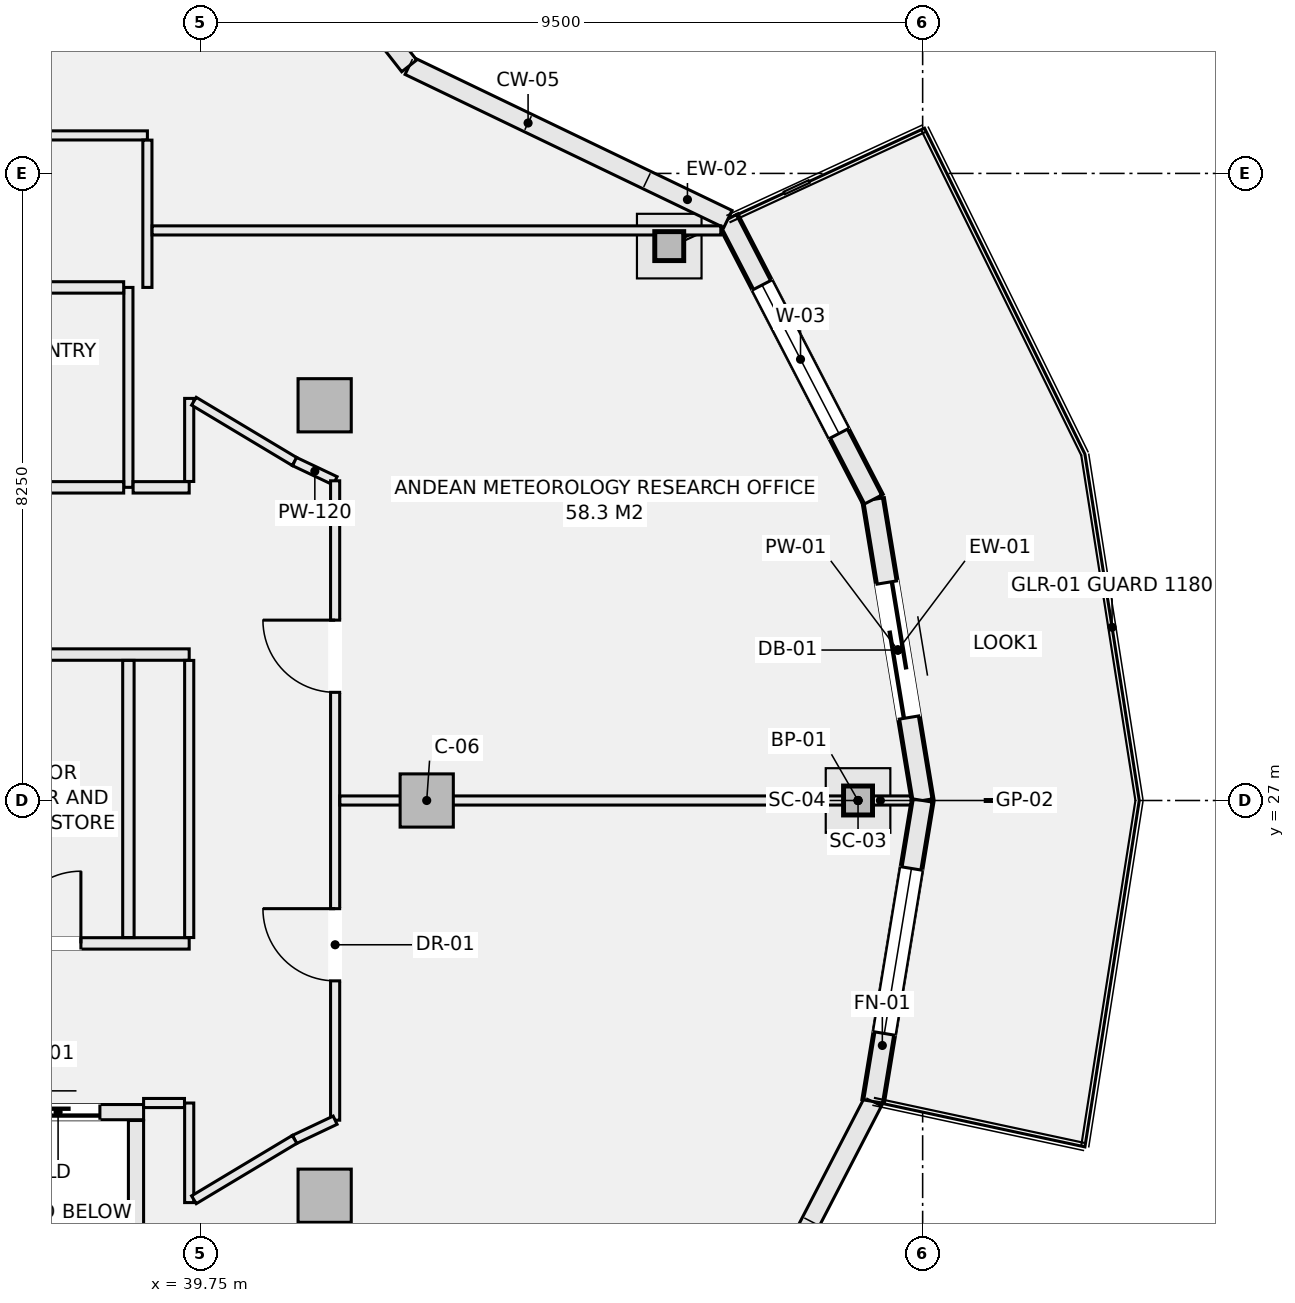
"""IFC4 building model, lengths in metres.
Left out: names, types, materials, properties, quantities, classifications, styles, units other than length and angle.
Written with IfcOpenShell. Run it as: python <this file> out.ifc"""

import sys

from ifc_helpers import new_model, si_unit, direction, frame, frame_2d, origin, origin_2d, place, context, subcontext, project, spatial, rectangle, hollow_rectangle, extrude, element, fill, save


model = new_model("IFC4")
c1 = context("Model", 3, precision=1e-05, world=origin(), true_north=direction((0.0, 1.0)))
c2 = subcontext(c1, "Body", "Model", "MODEL_VIEW")
j1 = project(units=[si_unit("LENGTHUNIT", "METRE"), si_unit("PLANEANGLEUNIT", "RADIAN")], contexts=[c1])
p1 = place(None, origin())
s1 = spatial("IfcSite", under=j1, at=p1, CompositionType="ELEMENT")
p2 = place(p1, origin())
s2 = spatial("IfcBuilding", under=s1, at=p2, CompositionType="ELEMENT")
p3 = place(p2, frame((0.0, 0.0, 281.6)))
s3 = spatial("IfcBuildingStorey", under=s2, at=p3, CompositionType="ELEMENT", Elevation=281.6)
for number, where, z_axis, x_axis in (
    (1, (48.4, 27.0, -0.28), (0.0, 0.0, 1.0), (1.0, 0.0, 0.0)),
    (2, (45.916, 34.294, -0.28), (0.0, 0.0, 1.0), (1.0, 0.0, 0.0)),
):
    element("IfcColumn", number, at=place(p3, frame(where, z_axis=z_axis, x_axis=x_axis)), inside=s3, PredefinedType="COLUMN", context=c2, shape_type="SweptSolid", body=[
        extrude(hollow_rectangle(XDim=0.406, YDim=0.406, WallThickness=0.016, at=origin_2d()), origin(), (0.0, 0.0, 1.0), 5.78),
    ])
for number, where, z_axis, x_axis in (
    (3, (42.725, 27.0, -0.28), (0.0, 0.0, 1.0), (1.0, 0.0, 0.0)),
    (4, (41.382, 32.199, -0.28), (0.0, 0.0, 1.0), (1.0, 0.0, 0.0)),
    (5, (41.382, 21.801, -0.28), (0.0, 0.0, 1.0), (1.0, 0.0, 0.0)),
):
    element("IfcColumn", number, at=place(p3, frame(where, z_axis=z_axis, x_axis=x_axis)), inside=s3, PredefinedType="COLUMN", context=c2, shape_type="SweptSolid", body=[
        extrude(rectangle(XDim=0.7, YDim=0.7, at=origin_2d()), origin(), (0.0, 0.0, 1.0), 5.78),
    ])
for number, where, z_axis, x_axis in (
    (6, (48.4, 27.0, 5.5), (0.0, 0.0, 1.0), (1.0, 0.0, 0.0)),
    (7, (45.916, 34.294, 5.5), (0.0, 0.0, 1.0), (1.0, 0.0, 0.0)),
):
    element("IfcColumn", number, at=place(p3, frame(where, z_axis=z_axis, x_axis=x_axis)), inside=s3, PredefinedType="COLUMN", context=c2, shape_type="SweptSolid", body=[
        extrude(hollow_rectangle(XDim=0.356, YDim=0.356, WallThickness=0.016, at=origin_2d()), origin(), (0.0, 0.0, 1.0), 4.2),
    ])
p4 = place(p3, frame((48.598, 30.96, 0.0), z_axis=(0.0, 0.0, 1.0), x_axis=(0.162366447696, -0.9867305289, 0.0)))
e8 = element("IfcWall", 8, at=p4, inside=s3, PredefinedType="SOLIDWALL", context=c2, shape_type="SweptSolid", body=[
    extrude(rectangle(XDim=4.013, YDim=0.3, at=frame_2d((2.007, 0.0))), origin(), (0.0, 0.0, 1.0), 4.292),
])
p5 = place(p4, frame((1.107, 0.0, 0.0)))
e9 = element("IfcOpeningElement", 9, at=p5, cuts=e8, PredefinedType="OPENING", context=c2, shape_type="SweptSolid", body=[
    extrude(rectangle(XDim=1.8, YDim=2.25, at=frame_2d((0.9, 1.125))), frame((0.0, 0.16, 0.0), z_axis=(0.0, -1.0, 0.0), x_axis=(1.0, 0.0, 0.0)), (0.0, 0.0, 1.0), 0.32),
])
p6 = place(p3, frame((46.688, 34.65, 0.0), z_axis=(0.0, 0.0, 1.0), x_axis=(0.459812881143, -0.888015830002, 0.0)))
e10 = element("IfcWall", 10, at=p6, inside=s3, PredefinedType="SOLIDWALL", context=c2, shape_type="SweptSolid", body=[
    extrude(rectangle(XDim=4.155, YDim=0.3, at=frame_2d((2.078, 0.0))), origin(), (0.0, 0.0, 1.0), 4.292),
])
p7 = place(p6, frame((0.978, 0.0, 0.72)))
e11 = element("IfcOpeningElement", 11, at=p7, cuts=e10, PredefinedType="OPENING", context=c2, shape_type="SweptSolid", body=[
    extrude(rectangle(XDim=2.2, YDim=1.65, at=frame_2d((1.1, 0.825))), frame((0.0, 0.16, 0.0), z_axis=(0.0, -1.0, 0.0), x_axis=(1.0, 0.0, 0.0)), (0.0, 0.0, 1.0), 0.32),
])
p8 = place(p3, frame((45.623, 35.162, 0.0), z_axis=(0.0, 0.0, 1.0), x_axis=(0.901303636532, -0.433187897769, 0.0)))
e12 = element("IfcWall", 12, at=p8, inside=s3, PredefinedType="SOLIDWALL", context=c2, shape_type="SweptSolid", body=[
    extrude(rectangle(XDim=1.181, YDim=0.22, at=frame_2d((0.591, 0.0))), origin(), (0.0, 0.0, 1.0), 4.292),
])
p9 = place(p3, frame((48.598, 23.04, 0.0), z_axis=(0.0, 0.0, 1.0), x_axis=(0.162366447696, 0.9867305289, 0.0)))
e13 = element("IfcWall", 13, at=p9, inside=s3, PredefinedType="SOLIDWALL", context=c2, shape_type="SweptSolid", body=[
    extrude(rectangle(XDim=4.013, YDim=0.3, at=frame_2d((2.007, 0.0))), origin(), (0.0, 0.0, 1.0), 4.292),
])
p10 = place(p9, frame((0.907, 0.0, 0.72)))
e14 = element("IfcOpeningElement", 14, at=p10, cuts=e13, PredefinedType="OPENING", context=c2, shape_type="SweptSolid", body=[
    extrude(rectangle(XDim=2.2, YDim=1.65, at=frame_2d((1.1, 0.825))), frame((0.0, 0.16, 0.0), z_axis=(0.0, -1.0, 0.0), x_axis=(1.0, 0.0, 0.0)), (0.0, 0.0, 1.0), 0.32),
])
p11 = place(p3, frame((48.598, 30.96, 5.75), z_axis=(0.0, 0.0, 1.0), x_axis=(0.162366447696, -0.9867305289, 0.0)))
e15 = element("IfcWall", 15, at=p11, inside=s3, PredefinedType="PARAPET", context=c2, shape_type="SweptSolid", body=[
    extrude(rectangle(XDim=4.013, YDim=0.25, at=frame_2d((2.007, 0.0))), origin(), (0.0, 0.0, 1.0), 1.15),
])
p12 = place(p3, frame((46.688, 34.65, 5.75), z_axis=(0.0, 0.0, 1.0), x_axis=(0.459812881143, -0.888015830002, 0.0)))
e16 = element("IfcWall", 16, at=p12, inside=s3, PredefinedType="PARAPET", context=c2, shape_type="SweptSolid", body=[
    extrude(rectangle(XDim=4.155, YDim=0.25, at=frame_2d((2.078, 0.0))), origin(), (0.0, 0.0, 1.0), 1.15),
])
p13 = place(p3, frame((42.494, 36.665, 5.75), z_axis=(0.0, 0.0, 1.0), x_axis=(0.901348560632, -0.433094414933, 0.0)))
e17 = element("IfcWall", 17, at=p13, inside=s3, PredefinedType="PARAPET", context=c2, shape_type="SweptSolid", body=[
    extrude(rectangle(XDim=4.652, YDim=0.25, at=frame_2d((2.326, 0.0))), origin(), (0.0, 0.0, 1.0), 1.15),
])
p14 = place(p3, frame((39.688, 40.25, 5.75), z_axis=(0.0, 0.0, 1.0), x_axis=(0.616428247224, -0.78741108452, 0.0)))
e18 = element("IfcWall", 18, at=p14, inside=s3, PredefinedType="PARAPET", context=c2, shape_type="SweptSolid", body=[
    extrude(rectangle(XDim=4.553, YDim=0.25, at=frame_2d((2.277, 0.0))), origin(), (0.0, 0.0, 1.0), 1.15),
])
p15 = place(p3, frame((46.688, 19.35, 5.75), z_axis=(0.0, 0.0, 1.0), x_axis=(0.459812881143, 0.888015830002, 0.0)))
e19 = element("IfcWall", 19, at=p15, inside=s3, PredefinedType="PARAPET", context=c2, shape_type="SweptSolid", body=[
    extrude(rectangle(XDim=4.155, YDim=0.25, at=frame_2d((2.078, 0.0))), origin(), (0.0, 0.0, 1.0), 1.15),
])
p16 = place(p3, frame((48.598, 23.04, 5.75), z_axis=(0.0, 0.0, 1.0), x_axis=(0.162366447696, 0.9867305289, 0.0)))
e20 = element("IfcWall", 20, at=p16, inside=s3, PredefinedType="PARAPET", context=c2, shape_type="SweptSolid", body=[
    extrude(rectangle(XDim=4.013, YDim=0.25, at=frame_2d((2.007, 0.0))), origin(), (0.0, 0.0, 1.0), 1.15),
])
p17 = place(p3, frame((36.75, 22.9, 0.0), z_axis=(0.0, 0.0, 1.0), x_axis=(1.0, 0.0, 0.0)))
e21 = element("IfcWall", 21, at=p17, inside=s3, PredefinedType="SOLIDWALL", context=c2, shape_type="SweptSolid", body=[
    extrude(rectangle(XDim=2.25, YDim=0.2, at=frame_2d((1.125, 0.0))), origin(), (0.0, 0.0, 1.0), 5.5),
])
p18 = place(p17, frame((0.575, 0.0, 0.0)))
e22 = element("IfcOpeningElement", 22, at=p18, cuts=e21, PredefinedType="OPENING", context=c2, shape_type="SweptSolid", body=[
    extrude(rectangle(XDim=1.1, YDim=2.2, at=frame_2d((0.55, 1.1))), frame((0.0, 0.11, 0.0), z_axis=(0.0, -1.0, 0.0), x_axis=(1.0, 0.0, 0.0)), (0.0, 0.0, 1.0), 0.22),
])
p19 = place(p3, frame((38.9, 20.36, 0.0), z_axis=(0.0, 0.0, 1.0), x_axis=(0.0, 1.0, 0.0)))
e23 = element("IfcWall", 23, at=p19, inside=s3, PredefinedType="SOLIDWALL", context=c2, shape_type="SweptSolid", body=[
    extrude(rectangle(XDim=2.43, YDim=0.2, at=frame_2d((1.215, 0.0))), origin(), (0.0, 0.0, 1.0), 5.5),
])
p20 = place(p3, frame((29.96, 25.12, 0.0), z_axis=(0.0, 0.0, 1.0), x_axis=(1.0, 0.0, 0.0)))
e24 = element("IfcWall", 24, at=p20, inside=s3, PredefinedType="PARTITIONING", context=c2, shape_type="SweptSolid", body=[
    extrude(rectangle(XDim=9.64, YDim=0.15, at=frame_2d((4.82, 0.0))), origin(), (0.0, 0.0, 1.0), 5.5),
])
p21 = place(p20, frame((3.05, 0.0, 0.0)))
e25 = element("IfcOpeningElement", 25, at=p21, cuts=e24, PredefinedType="OPENING", context=c2, shape_type="SweptSolid", body=[
    extrude(rectangle(XDim=0.95, YDim=2.1, at=frame_2d((0.475, 1.05))), frame((0.0, 0.085, 0.0), z_axis=(0.0, -1.0, 0.0), x_axis=(1.0, 0.0, 0.0)), (0.0, 0.0, 1.0), 0.17),
])
p22 = place(p20, frame((7.265, 0.0, 0.0)))
e26 = element("IfcOpeningElement", 26, at=p22, cuts=e24, PredefinedType="OPENING", context=c2, shape_type="SweptSolid", body=[
    extrude(rectangle(XDim=0.95, YDim=2.1, at=frame_2d((0.475, 1.05))), frame((0.0, 0.085, 0.0), z_axis=(0.0, -1.0, 0.0), x_axis=(1.0, 0.0, 0.0)), (0.0, 0.0, 1.0), 0.17),
])
p23 = place(p3, frame((30.077, 28.92, 0.0), z_axis=(0.0, 0.0, 1.0), x_axis=(1.0, 0.0, 0.0)))
e27 = element("IfcWall", 27, at=p23, inside=s3, PredefinedType="PARTITIONING", context=c2, shape_type="SweptSolid", body=[
    extrude(rectangle(XDim=9.523, YDim=0.15, at=frame_2d((4.762, 0.0))), origin(), (0.0, 0.0, 1.0), 5.5),
])
p24 = place(p3, frame((38.8, 25.197, 0.0), z_axis=(0.0, 0.0, 1.0), x_axis=(0.0, 1.0, 0.0)))
e28 = element("IfcWall", 28, at=p24, inside=s3, PredefinedType="PARTITIONING", context=c2, shape_type="SweptSolid", body=[
    extrude(rectangle(XDim=3.646, YDim=0.15, at=frame_2d((1.823, 0.0))), origin(), (0.0, 0.0, 1.0), 5.5),
])
p25 = place(p3, frame((38.8, 31.12, 0.0), z_axis=(0.0, 0.0, 1.0), x_axis=(0.0, 1.0, 0.0)))
e29 = element("IfcWall", 29, at=p25, inside=s3, PredefinedType="PARTITIONING", context=c2, shape_type="SweptSolid", body=[
    extrude(rectangle(XDim=2.63, YDim=0.12, at=frame_2d((1.315, 0.0))), origin(), (0.0, 0.0, 1.0), 5.5),
])
p26 = place(p3, frame((30.077, 31.12, 0.0), z_axis=(0.0, 0.0, 1.0), x_axis=(1.0, 0.0, 0.0)))
e30 = element("IfcWall", 30, at=p26, inside=s3, PredefinedType="PARTITIONING", context=c2, shape_type="SweptSolid", body=[
    extrude(rectangle(XDim=8.661, YDim=0.15, at=frame_2d((4.331, 0.0))), origin(), (0.0, 0.0, 1.0), 5.5),
])
p27 = place(p26, frame((1.892, 0.0, 0.0)))
e31 = element("IfcOpeningElement", 31, at=p27, cuts=e30, PredefinedType="OPENING", context=c2, shape_type="SweptSolid", body=[
    extrude(rectangle(XDim=0.95, YDim=2.1, at=frame_2d((0.475, 1.05))), frame((0.0, 0.085, 0.0), z_axis=(0.0, -1.0, 0.0), x_axis=(1.0, 0.0, 0.0)), (0.0, 0.0, 1.0), 0.17),
])
p28 = place(p26, frame((5.812, 0.0, 0.0)))
e32 = element("IfcOpeningElement", 32, at=p28, cuts=e30, PredefinedType="OPENING", context=c2, shape_type="SweptSolid", body=[
    extrude(rectangle(XDim=0.95, YDim=2.1, at=frame_2d((0.475, 1.05))), frame((0.0, 0.085, 0.0), z_axis=(0.0, -1.0, 0.0), x_axis=(1.0, 0.0, 0.0)), (0.0, 0.0, 1.0), 0.17),
])
p29 = place(p3, frame((38.862, 31.12, 0.0), z_axis=(0.0, 0.0, 1.0), x_axis=(1.0, 0.0, 0.0)))
e33 = element("IfcWall", 33, at=p29, inside=s3, PredefinedType="PARTITIONING", context=c2, shape_type="SweptSolid", body=[
    extrude(rectangle(XDim=0.738, YDim=0.15, at=frame_2d((0.369, 0.0))), origin(), (0.0, 0.0, 1.0), 5.5),
])
p30 = place(p3, frame((30.077, 33.75, 0.0), z_axis=(0.0, 0.0, 1.0), x_axis=(1.0, 0.0, 0.0)))
e34 = element("IfcWall", 34, at=p30, inside=s3, PredefinedType="PARTITIONING", context=c2, shape_type="SweptSolid", body=[
    extrude(rectangle(XDim=8.661, YDim=0.15, at=frame_2d((4.331, 0.0))), origin(), (0.0, 0.0, 1.0), 5.5),
])
p31 = place(p3, frame((33.913, 35.75, 0.0), z_axis=(0.0, 0.0, 1.0), x_axis=(1.0, 0.0, 0.0)))
e35 = element("IfcWall", 35, at=p31, inside=s3, PredefinedType="PARTITIONING", context=c2, shape_type="SweptSolid", body=[
    extrude(rectangle(XDim=5.137, YDim=0.12, at=frame_2d((2.568, 0.0))), origin(), (0.0, 0.0, 1.0), 4.948),
])
p32 = place(p31, frame((1.674, 0.0, 0.0)))
e36 = element("IfcOpeningElement", 36, at=p32, cuts=e35, PredefinedType="OPENING", context=c2, shape_type="SweptSolid", body=[
    extrude(rectangle(XDim=0.95, YDim=2.1, at=frame_2d((0.475, 1.05))), frame((0.0, 0.07, 0.0), z_axis=(0.0, -1.0, 0.0), x_axis=(1.0, 0.0, 0.0)), (0.0, 0.0, 1.0), 0.14),
])
p33 = place(p3, frame((39.05, 33.75, 0.0), z_axis=(0.0, 0.0, 1.0), x_axis=(0.0, 1.0, 0.0)))
e37 = element("IfcWall", 37, at=p33, inside=s3, PredefinedType="PARTITIONING", context=c2, shape_type="SweptSolid", body=[
    extrude(rectangle(XDim=1.938, YDim=0.12, at=frame_2d((0.969, 0.0))), origin(), (0.0, 0.0, 1.0), 5.5),
])
p34 = place(p3, frame((39.6, 21.71, 0.0), z_axis=(0.0, 0.0, 1.0), x_axis=(0.0, 1.0, 0.0)))
e38 = element("IfcWall", 38, at=p34, inside=s3, PredefinedType="PARTITIONING", context=c2, shape_type="SweptSolid", body=[
    extrude(rectangle(XDim=1.31, YDim=0.12, at=frame_2d((0.655, 0.0))), origin(), (0.0, 0.0, 1.0), 5.5),
])
p35 = place(p3, frame((39.6, 25.197, 0.0), z_axis=(0.0, 0.0, 1.0), x_axis=(0.0, 1.0, 0.0)))
e39 = element("IfcWall", 39, at=p35, inside=s3, PredefinedType="PARTITIONING", context=c2, shape_type="SweptSolid", body=[
    extrude(rectangle(XDim=3.646, YDim=0.12, at=frame_2d((1.823, 0.0))), origin(), (0.0, 0.0, 1.0), 5.5),
])
p36 = place(p3, frame((39.6, 31.197, 0.0), z_axis=(0.0, 0.0, 1.0), x_axis=(0.0, 1.0, 0.0)))
e40 = element("IfcWall", 40, at=p36, inside=s3, PredefinedType="PARTITIONING", context=c2, shape_type="SweptSolid", body=[
    extrude(rectangle(XDim=1.093, YDim=0.12, at=frame_2d((0.546, 0.0))), origin(), (0.0, 0.0, 1.0), 5.5),
])
p37 = place(p3, frame((39.662, 32.253, 0.0), z_axis=(0.0, 0.0, 1.0), x_axis=(0.857688234944, -0.514170099908, 0.0)))
e41 = element("IfcWall", 41, at=p37, inside=s3, PredefinedType="PARTITIONING", context=c2, shape_type="SweptSolid", body=[
    extrude(rectangle(XDim=1.544, YDim=0.12, at=frame_2d((0.772, 0.0))), origin(), (0.0, 0.0, 1.0), 5.5),
])
p38 = place(p3, frame((40.986, 31.459, 0.0), z_axis=(0.0, 0.0, 1.0), x_axis=(0.903729424576, -0.428104107847, 0.0)))
e42 = element("IfcWall", 42, at=p38, inside=s3, PredefinedType="PARTITIONING", context=c2, shape_type="SweptSolid", body=[
    extrude(rectangle(XDim=0.591, YDim=0.12, at=frame_2d((0.295, 0.0))), origin(), (0.0, 0.0, 1.0), 5.5),
])
p39 = place(p3, frame((41.52, 22.794, 0.0), z_axis=(0.0, 0.0, 1.0), x_axis=(0.0, 1.0, 0.0)))
e43 = element("IfcWall", 43, at=p39, inside=s3, PredefinedType="PARTITIONING", context=c2, shape_type="SweptSolid", body=[
    extrude(rectangle(XDim=8.412, YDim=0.12, at=frame_2d((4.206, 0.0))), origin(), (0.0, 0.0, 1.0), 4.948),
])
p40 = place(p39, frame((1.833, 0.0, 0.0)))
e44 = element("IfcOpeningElement", 44, at=p40, cuts=e43, PredefinedType="OPENING", context=c2, shape_type="SweptSolid", body=[
    extrude(rectangle(XDim=0.95, YDim=2.1, at=frame_2d((0.475, 1.05))), frame((0.0, 0.07, 0.0), z_axis=(0.0, -1.0, 0.0), x_axis=(1.0, 0.0, 0.0)), (0.0, 0.0, 1.0), 0.14),
])
p41 = place(p39, frame((5.629, 0.0, 0.0)))
e45 = element("IfcOpeningElement", 45, at=p41, cuts=e43, PredefinedType="OPENING", context=c2, shape_type="SweptSolid", body=[
    extrude(rectangle(XDim=0.95, YDim=2.1, at=frame_2d((0.475, 1.05))), frame((0.0, 0.07, 0.0), z_axis=(0.0, -1.0, 0.0), x_axis=(1.0, 0.0, 0.0)), (0.0, 0.0, 1.0), 0.14),
])
p42 = place(p3, frame((40.986, 22.541, 0.0), z_axis=(0.0, 0.0, 1.0), x_axis=(0.903729424576, 0.428104107847, 0.0)))
e46 = element("IfcWall", 46, at=p42, inside=s3, PredefinedType="PARTITIONING", context=c2, shape_type="SweptSolid", body=[
    extrude(rectangle(XDim=0.591, YDim=0.12, at=frame_2d((0.295, 0.0))), origin(), (0.0, 0.0, 1.0), 5.5),
])
p43 = place(p3, frame((39.662, 21.747, 0.0), z_axis=(0.0, 0.0, 1.0), x_axis=(0.857688234944, 0.514170099908, 0.0)))
e47 = element("IfcWall", 47, at=p43, inside=s3, PredefinedType="PARTITIONING", context=c2, shape_type="SweptSolid", body=[
    extrude(rectangle(XDim=1.544, YDim=0.12, at=frame_2d((0.772, 0.0))), origin(), (0.0, 0.0, 1.0), 5.5),
])
p44 = place(p3, frame((39.0, 23.02, 0.0), z_axis=(0.0, 0.0, 1.0), x_axis=(1.0, 0.0, 0.0)))
e48 = element("IfcWall", 48, at=p44, inside=s3, PredefinedType="PARTITIONING", context=c2, shape_type="SweptSolid", body=[
    extrude(rectangle(XDim=0.538, YDim=0.12, at=frame_2d((0.269, 0.0))), origin(), (0.0, 0.0, 1.0), 5.5),
])
p45 = place(p3, frame((41.582, 27.0, 0.0), z_axis=(0.0, 0.0, 1.0), x_axis=(1.0, 0.0, 0.0)))
e49 = element("IfcWall", 49, at=p45, inside=s3, PredefinedType="PARTITIONING", context=c2, shape_type="SweptSolid", body=[
    extrude(rectangle(XDim=7.514, YDim=0.12, at=frame_2d((3.757, 0.0))), origin(), (0.0, 0.0, 1.0), 4.292),
])
p46 = place(p3, frame((39.112, 34.5, 0.0), z_axis=(0.0, 0.0, 1.0), x_axis=(1.0, 0.0, 0.0)))
e50 = element("IfcWall", 50, at=p46, inside=s3, PredefinedType="PARTITIONING", context=c2, shape_type="SweptSolid", body=[
    extrude(rectangle(XDim=7.482, YDim=0.12, at=frame_2d((3.741, 0.0))), origin(), (0.0, 0.0, 1.0), 4.292),
])
p47 = place(p5, origin())
e51 = element("IfcDoor", 51, at=p47, inside=s3, OperationType="SLIDING_TO_LEFT", PredefinedType="DOOR", context=c2, shape_type="SweptSolid", body=[
    extrude(rectangle(XDim=1.8, YDim=2.25, at=frame_2d((0.9, 1.125))), frame((0.0, 0.025, 0.0), z_axis=(0.0, -1.0, 0.0), x_axis=(1.0, 0.0, 0.0)), (0.0, 0.0, 1.0), 0.05),
])
fill(e9, e51)
p48 = place(p7, origin())
e52 = element("IfcWindow", 52, at=p48, inside=s3, PartitioningType="SINGLE_PANEL", PredefinedType="WINDOW", context=c2, shape_type="SweptSolid", body=[
    extrude(rectangle(XDim=2.2, YDim=1.65, at=frame_2d((1.1, 0.825))), frame((0.0, 0.03, 0.0), z_axis=(0.0, -1.0, 0.0), x_axis=(1.0, 0.0, 0.0)), (0.0, 0.0, 1.0), 0.06),
])
fill(e11, e52)
p49 = place(p10, origin())
e53 = element("IfcWindow", 53, at=p49, inside=s3, PartitioningType="SINGLE_PANEL", PredefinedType="WINDOW", context=c2, shape_type="SweptSolid", body=[
    extrude(rectangle(XDim=2.2, YDim=1.65, at=frame_2d((1.1, 0.825))), frame((0.0, 0.03, 0.0), z_axis=(0.0, -1.0, 0.0), x_axis=(1.0, 0.0, 0.0)), (0.0, 0.0, 1.0), 0.06),
])
fill(e14, e53)
p50 = place(p18, origin())
e54 = element("IfcDoor", 54, at=p50, inside=s3, OperationType="SLIDING_TO_LEFT", PredefinedType="DOOR", context=c2, shape_type="SweptSolid", body=[
    extrude(rectangle(XDim=1.1, YDim=2.2, at=frame_2d((0.55, 1.1))), frame((0.0, 0.025, 0.0), z_axis=(0.0, -1.0, 0.0), x_axis=(1.0, 0.0, 0.0)), (0.0, 0.0, 1.0), 0.05),
])
fill(e22, e54)
p51 = place(p22, origin())
e55 = element("IfcDoor", 55, at=p51, inside=s3, OperationType="SINGLE_SWING_RIGHT", PredefinedType="DOOR", context=c2, shape_type="SweptSolid", body=[
    extrude(rectangle(XDim=0.95, YDim=2.1, at=frame_2d((0.475, 1.05))), frame((0.0, 0.025, 0.0), z_axis=(0.0, -1.0, 0.0), x_axis=(1.0, 0.0, 0.0)), (0.0, 0.0, 1.0), 0.05),
])
fill(e26, e55)
p52 = place(p40, origin())
e56 = element("IfcDoor", 56, at=p52, inside=s3, OperationType="SINGLE_SWING_RIGHT", PredefinedType="DOOR", context=c2, shape_type="SweptSolid", body=[
    extrude(rectangle(XDim=0.95, YDim=2.1, at=frame_2d((0.475, 1.05))), frame((0.0, 0.025, 0.0), z_axis=(0.0, -1.0, 0.0), x_axis=(1.0, 0.0, 0.0)), (0.0, 0.0, 1.0), 0.05),
])
fill(e44, e56)
p53 = place(p41, origin())
e57 = element("IfcDoor", 57, at=p53, inside=s3, OperationType="SINGLE_SWING_RIGHT", PredefinedType="DOOR", context=c2, shape_type="SweptSolid", body=[
    extrude(rectangle(XDim=0.95, YDim=2.1, at=frame_2d((0.475, 1.05))), frame((0.0, 0.025, 0.0), z_axis=(0.0, -1.0, 0.0), x_axis=(1.0, 0.0, 0.0)), (0.0, 0.0, 1.0), 0.05),
])
fill(e45, e57)
save(model, sys.argv[1])
